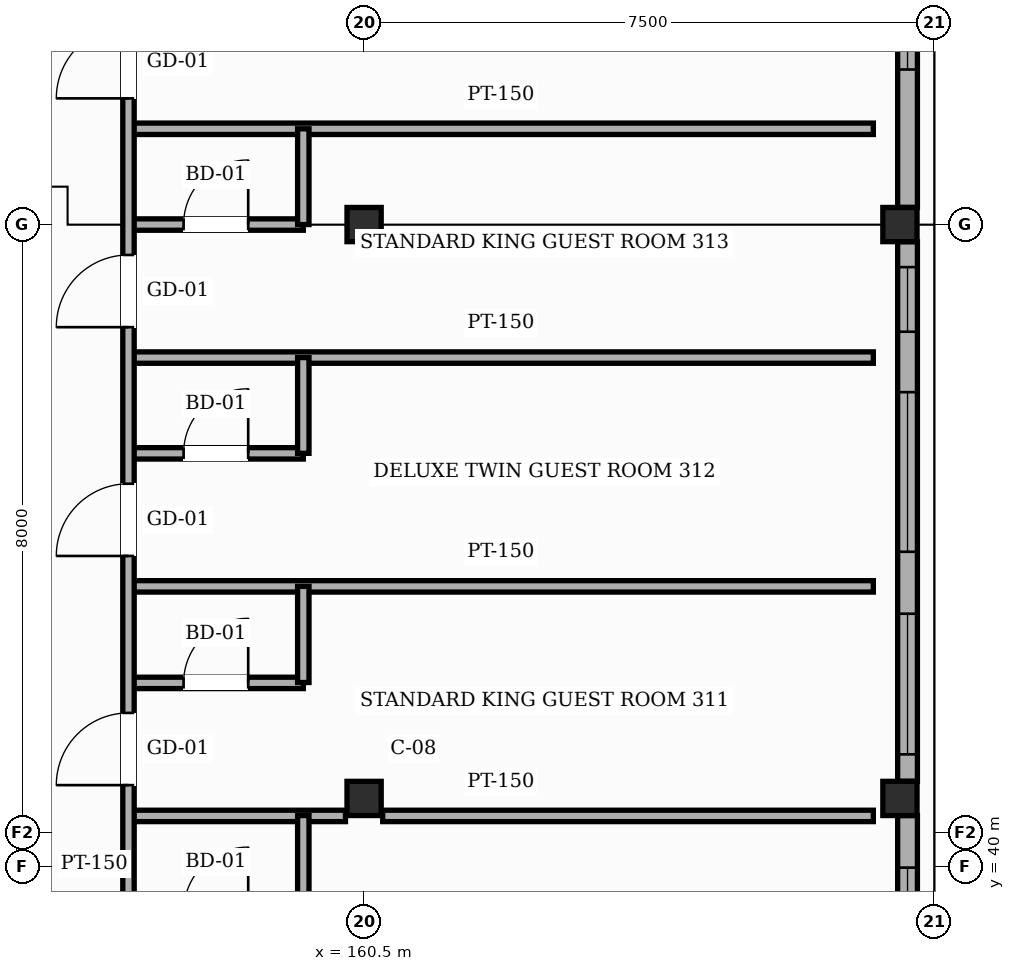
"""IFC4 building model, lengths in metres.
Left out: names, types, materials, properties, quantities, classifications, styles, units other than length and angle.
Written with IfcOpenShell. Run it as: python <this file> out.ifc"""

import sys

from ifc_helpers import new_model, si_unit, direction, frame, frame_2d, origin, origin_2d, place, context, subcontext, project, spatial, rectangle, hollow_rectangle, extrude, element, fill, save


model = new_model("IFC4")
c1 = context("Model", 3, precision=1e-05, world=origin(), true_north=direction((0.0, 1.0)))
c2 = subcontext(c1, "Body", "Model", "MODEL_VIEW")
j1 = project(units=[si_unit("LENGTHUNIT", "METRE"), si_unit("PLANEANGLEUNIT", "RADIAN")], contexts=[c1])
p1 = place(None, origin())
s1 = spatial("IfcSite", under=j1, at=p1, CompositionType="ELEMENT")
p2 = place(p1, origin())
s2 = spatial("IfcBuilding", under=s1, at=p2, CompositionType="ELEMENT")
p3 = place(p2, frame((0.0, 0.0, 42.6)))
s3 = spatial("IfcBuildingStorey", under=s2, at=p3, CompositionType="ELEMENT", Elevation=42.6)
for number, where, z_axis, x_axis in (
    (1, (160.5, 40.9, 0.0), (0.0, 0.0, 1.0), (1.0, 0.0, 0.0)),
    (2, (160.5, 48.45, 0.0), (0.0, 0.0, 1.0), (1.0, 0.0, 0.0)),
    (3, (167.55, 40.9, 0.0), (0.0, 0.0, 1.0), (1.0, 0.0, 0.0)),
    (4, (167.55, 48.45, 0.0), (0.0, 0.0, 1.0), (1.0, 0.0, 0.0)),
):
    element("IfcColumn", number, at=place(p3, frame(where, z_axis=z_axis, x_axis=x_axis)), inside=s3, PredefinedType="COLUMN", context=c2, shape_type="SweptSolid", body=[
        extrude(hollow_rectangle(XDim=0.45, YDim=0.45, WallThickness=0.019, InnerFilletRadius=0.019, OuterFilletRadius=0.038, at=origin_2d()), origin(), (0.0, 0.0, 1.0), 3.6),
    ])
p4 = place(p3, frame((167.65, 40.675, 0.0), z_axis=(0.0, 0.0, 1.0), x_axis=(0.0, -1.0, 0.0)))
e5 = element("IfcWall", 5, at=p4, inside=s3, PredefinedType="SOLIDWALL", context=c2, shape_type="SweptSolid", body=[
    extrude(rectangle(XDim=8.45, YDim=0.26, at=frame_2d((4.225, 0.0))), origin(), (0.0, 0.0, 1.0), 2.755),
])
p5 = place(p4, frame((6.61, 0.0, 0.85)))
e6 = element("IfcOpeningElement", 6, at=p5, cuts=e5, PredefinedType="OPENING", context=c2, shape_type="SweptSolid", body=[
    extrude(rectangle(XDim=1.25, YDim=1.65, at=frame_2d((0.625, 0.825))), frame((0.0, 0.14, 0.0), z_axis=(0.0, -1.0, 0.0), x_axis=(1.0, 0.0, 0.0)), (0.0, 0.0, 1.0), 0.28),
])
p6 = place(p4, frame((3.795, 0.0, 0.85)))
e7 = element("IfcOpeningElement", 7, at=p6, cuts=e5, PredefinedType="OPENING", context=c2, shape_type="SweptSolid", body=[
    extrude(rectangle(XDim=1.45, YDim=1.65, at=frame_2d((0.725, 0.825))), frame((0.0, 0.14, 0.0), z_axis=(0.0, -1.0, 0.0), x_axis=(1.0, 0.0, 0.0)), (0.0, 0.0, 1.0), 0.28),
])
p7 = place(p4, frame((0.685, 0.0, 0.85)))
e8 = element("IfcOpeningElement", 8, at=p7, cuts=e5, PredefinedType="OPENING", context=c2, shape_type="SweptSolid", body=[
    extrude(rectangle(XDim=1.65, YDim=1.65, at=frame_2d((0.825, 0.825))), frame((0.0, 0.14, 0.0), z_axis=(0.0, -1.0, 0.0), x_axis=(1.0, 0.0, 0.0)), (0.0, 0.0, 1.0), 0.28),
])
p8 = place(p3, frame((167.65, 48.225, 0.0), z_axis=(0.0, 0.0, 1.0), x_axis=(0.0, -1.0, 0.0)))
e9 = element("IfcWall", 9, at=p8, inside=s3, PredefinedType="SOLIDWALL", context=c2, shape_type="SweptSolid", body=[
    extrude(rectangle(XDim=7.1, YDim=0.26, at=frame_2d((3.55, 0.0))), origin(), (0.0, 0.0, 1.0), 2.755),
])
p9 = place(p8, frame((4.895, 0.0, 0.85)))
e10 = element("IfcOpeningElement", 10, at=p9, cuts=e9, PredefinedType="OPENING", context=c2, shape_type="SweptSolid", body=[
    extrude(rectangle(XDim=1.85, YDim=1.65, at=frame_2d((0.925, 0.825))), frame((0.0, 0.14, 0.0), z_axis=(0.0, -1.0, 0.0), x_axis=(1.0, 0.0, 0.0)), (0.0, 0.0, 1.0), 0.28),
])
p10 = place(p8, frame((1.98, 0.0, 0.85)))
e11 = element("IfcOpeningElement", 11, at=p10, cuts=e9, PredefinedType="OPENING", context=c2, shape_type="SweptSolid", body=[
    extrude(rectangle(XDim=2.1, YDim=1.65, at=frame_2d((1.05, 0.825))), frame((0.0, 0.14, 0.0), z_axis=(0.0, -1.0, 0.0), x_axis=(1.0, 0.0, 0.0)), (0.0, 0.0, 1.0), 0.28),
])
p11 = place(p8, frame((0.335, 0.0, 0.85)))
e12 = element("IfcOpeningElement", 12, at=p11, cuts=e9, PredefinedType="OPENING", context=c2, shape_type="SweptSolid", body=[
    extrude(rectangle(XDim=0.85, YDim=1.35, at=frame_2d((0.425, 0.675))), frame((0.0, 0.14, 0.0), z_axis=(0.0, -1.0, 0.0), x_axis=(1.0, 0.0, 0.0)), (0.0, 0.0, 1.0), 0.28),
])
p12 = place(p3, frame((167.65, 56.225, 0.0), z_axis=(0.0, 0.0, 1.0), x_axis=(0.0, -1.0, 0.0)))
e13 = element("IfcWall", 13, at=p12, inside=s3, PredefinedType="SOLIDWALL", context=c2, shape_type="SweptSolid", body=[
    extrude(rectangle(XDim=7.55, YDim=0.26, at=frame_2d((3.775, 0.0))), origin(), (0.0, 0.0, 1.0), 2.755),
])
p13 = place(p12, frame((4.285, 0.0, 0.85)))
e14 = element("IfcOpeningElement", 14, at=p13, cuts=e13, PredefinedType="OPENING", context=c2, shape_type="SweptSolid", body=[
    extrude(rectangle(XDim=1.45, YDim=1.35, at=frame_2d((0.725, 0.675))), frame((0.0, 0.14, 0.0), z_axis=(0.0, -1.0, 0.0), x_axis=(1.0, 0.0, 0.0)), (0.0, 0.0, 1.0), 0.28),
])
p14 = place(p12, frame((1.165, 0.0, 0.85)))
e15 = element("IfcOpeningElement", 15, at=p14, cuts=e13, PredefinedType="OPENING", context=c2, shape_type="SweptSolid", body=[
    extrude(rectangle(XDim=1.65, YDim=1.35, at=frame_2d((0.825, 0.675))), frame((0.0, 0.14, 0.0), z_axis=(0.0, -1.0, 0.0), x_axis=(1.0, 0.0, 0.0)), (0.0, 0.0, 1.0), 0.28),
])
p15 = place(p3, frame((157.4, 40.67, 0.0), z_axis=(0.0, 0.0, 1.0), x_axis=(1.0, 0.0, 0.0)))
e16 = element("IfcWall", 16, at=p15, inside=s3, PredefinedType="PARTITIONING", context=c2, shape_type="SweptSolid", body=[
    extrude(rectangle(XDim=2.855, YDim=0.15, at=frame_2d((1.427, 0.0))), origin(), (0.0, 0.0, 1.0), 2.755),
])
p16 = place(p3, frame((160.745, 40.67, 0.0), z_axis=(0.0, 0.0, 1.0), x_axis=(1.0, 0.0, 0.0)))
e17 = element("IfcWall", 17, at=p16, inside=s3, PredefinedType="PARTITIONING", context=c2, shape_type="SweptSolid", body=[
    extrude(rectangle(XDim=6.455, YDim=0.15, at=frame_2d((3.228, 0.0))), origin(), (0.0, 0.0, 1.0), 2.905),
])
p17 = place(p3, frame((157.4, 42.42, 0.0), z_axis=(0.0, 0.0, 1.0), x_axis=(1.0, 0.0, 0.0)))
e18 = element("IfcWall", 18, at=p17, inside=s3, PredefinedType="PARTITIONING", context=c2, shape_type="SweptSolid", body=[
    extrude(rectangle(XDim=2.3, YDim=0.15, at=frame_2d((1.15, 0.0))), origin(), (0.0, 0.0, 1.0), 3.365),
])
p18 = place(p17, frame((0.725, 0.0, 0.0)))
e19 = element("IfcOpeningElement", 19, at=p18, cuts=e18, PredefinedType="OPENING", context=c2, shape_type="SweptSolid", body=[
    extrude(rectangle(XDim=0.85, YDim=2.1, at=frame_2d((0.425, 1.05))), frame((0.0, 0.085, 0.0), z_axis=(0.0, -1.0, 0.0), x_axis=(1.0, 0.0, 0.0)), (0.0, 0.0, 1.0), 0.17),
])
p19 = place(p3, frame((157.4, 43.69, 0.0), z_axis=(0.0, 0.0, 1.0), x_axis=(1.0, 0.0, 0.0)))
e20 = element("IfcWall", 20, at=p19, inside=s3, PredefinedType="PARTITIONING", context=c2, shape_type="SweptSolid", body=[
    extrude(rectangle(XDim=9.8, YDim=0.15, at=frame_2d((4.9, 0.0))), origin(), (0.0, 0.0, 1.0), 3.365),
])
p20 = place(p3, frame((157.4, 45.44, 0.0), z_axis=(0.0, 0.0, 1.0), x_axis=(1.0, 0.0, 0.0)))
e21 = element("IfcWall", 21, at=p20, inside=s3, PredefinedType="PARTITIONING", context=c2, shape_type="SweptSolid", body=[
    extrude(rectangle(XDim=2.3, YDim=0.15, at=frame_2d((1.15, 0.0))), origin(), (0.0, 0.0, 1.0), 3.365),
])
p21 = place(p20, frame((0.725, 0.0, 0.0)))
e22 = element("IfcOpeningElement", 22, at=p21, cuts=e21, PredefinedType="OPENING", context=c2, shape_type="SweptSolid", body=[
    extrude(rectangle(XDim=0.85, YDim=2.1, at=frame_2d((0.425, 1.05))), frame((0.0, 0.085, 0.0), z_axis=(0.0, -1.0, 0.0), x_axis=(1.0, 0.0, 0.0)), (0.0, 0.0, 1.0), 0.17),
])
p22 = place(p3, frame((157.4, 46.7, 0.0), z_axis=(0.0, 0.0, 1.0), x_axis=(1.0, 0.0, 0.0)))
e23 = element("IfcWall", 23, at=p22, inside=s3, PredefinedType="PARTITIONING", context=c2, shape_type="SweptSolid", body=[
    extrude(rectangle(XDim=9.8, YDim=0.15, at=frame_2d((4.9, 0.0))), origin(), (0.0, 0.0, 1.0), 3.365),
])
p23 = place(p3, frame((157.4, 48.45, 0.0), z_axis=(0.0, 0.0, 1.0), x_axis=(1.0, 0.0, 0.0)))
e24 = element("IfcWall", 24, at=p23, inside=s3, PredefinedType="PARTITIONING", context=c2, shape_type="SweptSolid", body=[
    extrude(rectangle(XDim=2.3, YDim=0.15, at=frame_2d((1.15, 0.0))), origin(), (0.0, 0.0, 1.0), 3.365),
])
p24 = place(p23, frame((0.725, 0.0, 0.0)))
e25 = element("IfcOpeningElement", 25, at=p24, cuts=e24, PredefinedType="OPENING", context=c2, shape_type="SweptSolid", body=[
    extrude(rectangle(XDim=0.85, YDim=2.1, at=frame_2d((0.425, 1.05))), frame((0.0, 0.085, 0.0), z_axis=(0.0, -1.0, 0.0), x_axis=(1.0, 0.0, 0.0)), (0.0, 0.0, 1.0), 0.17),
])
p25 = place(p3, frame((157.4, 49.71, 0.0), z_axis=(0.0, 0.0, 1.0), x_axis=(1.0, 0.0, 0.0)))
e26 = element("IfcWall", 26, at=p25, inside=s3, PredefinedType="PARTITIONING", context=c2, shape_type="SweptSolid", body=[
    extrude(rectangle(XDim=9.8, YDim=0.15, at=frame_2d((4.9, 0.0))), origin(), (0.0, 0.0, 1.0), 3.365),
])
p26 = place(p3, frame((157.4, 22.6, 0.0), z_axis=(0.0, 0.0, 1.0), x_axis=(0.0, 1.0, 0.0)))
e27 = element("IfcWall", 27, at=p26, inside=s3, PredefinedType="PARTITIONING", context=c2, shape_type="SweptSolid", body=[
    extrude(rectangle(XDim=48.2, YDim=0.15, at=frame_2d((24.1, 0.0))), origin(), (0.0, 0.0, 1.0), 3.365),
])
p27 = place(p26, frame((0.325, 0.0, 0.0)))
e28 = element("IfcOpeningElement", 28, at=p27, cuts=e27, PredefinedType="OPENING", context=c2, shape_type="SweptSolid", body=[
    extrude(rectangle(XDim=1.1, YDim=2.2, at=frame_2d((0.55, 1.1))), frame((0.0, 0.085, 0.0), z_axis=(0.0, -1.0, 0.0), x_axis=(1.0, 0.0, 0.0)), (0.0, 0.0, 1.0), 0.17),
])
p28 = place(p26, frame((3.41, 0.0, 0.0)))
e29 = element("IfcOpeningElement", 29, at=p28, cuts=e27, PredefinedType="OPENING", context=c2, shape_type="SweptSolid", body=[
    extrude(rectangle(XDim=0.95, YDim=2.15, at=frame_2d((0.475, 1.075))), frame((0.0, 0.085, 0.0), z_axis=(0.0, -1.0, 0.0), x_axis=(1.0, 0.0, 0.0)), (0.0, 0.0, 1.0), 0.17),
])
p29 = place(p26, frame((6.425, 0.0, 0.0)))
e30 = element("IfcOpeningElement", 30, at=p29, cuts=e27, PredefinedType="OPENING", context=c2, shape_type="SweptSolid", body=[
    extrude(rectangle(XDim=0.95, YDim=2.15, at=frame_2d((0.475, 1.075))), frame((0.0, 0.085, 0.0), z_axis=(0.0, -1.0, 0.0), x_axis=(1.0, 0.0, 0.0)), (0.0, 0.0, 1.0), 0.17),
])
p30 = place(p26, frame((9.44, 0.0, 0.0)))
e31 = element("IfcOpeningElement", 31, at=p30, cuts=e27, PredefinedType="OPENING", context=c2, shape_type="SweptSolid", body=[
    extrude(rectangle(XDim=0.95, YDim=2.15, at=frame_2d((0.475, 1.075))), frame((0.0, 0.085, 0.0), z_axis=(0.0, -1.0, 0.0), x_axis=(1.0, 0.0, 0.0)), (0.0, 0.0, 1.0), 0.17),
])
p31 = place(p26, frame((12.45, 0.0, 0.0)))
e32 = element("IfcOpeningElement", 32, at=p31, cuts=e27, PredefinedType="OPENING", context=c2, shape_type="SweptSolid", body=[
    extrude(rectangle(XDim=0.95, YDim=2.15, at=frame_2d((0.475, 1.075))), frame((0.0, 0.085, 0.0), z_axis=(0.0, -1.0, 0.0), x_axis=(1.0, 0.0, 0.0)), (0.0, 0.0, 1.0), 0.17),
])
p32 = place(p26, frame((15.46, 0.0, 0.0)))
e33 = element("IfcOpeningElement", 33, at=p32, cuts=e27, PredefinedType="OPENING", context=c2, shape_type="SweptSolid", body=[
    extrude(rectangle(XDim=0.95, YDim=2.15, at=frame_2d((0.475, 1.075))), frame((0.0, 0.085, 0.0), z_axis=(0.0, -1.0, 0.0), x_axis=(1.0, 0.0, 0.0)), (0.0, 0.0, 1.0), 0.17),
])
p33 = place(p26, frame((18.475, 0.0, 0.0)))
e34 = element("IfcOpeningElement", 34, at=p33, cuts=e27, PredefinedType="OPENING", context=c2, shape_type="SweptSolid", body=[
    extrude(rectangle(XDim=0.95, YDim=2.15, at=frame_2d((0.475, 1.075))), frame((0.0, 0.085, 0.0), z_axis=(0.0, -1.0, 0.0), x_axis=(1.0, 0.0, 0.0)), (0.0, 0.0, 1.0), 0.17),
])
p34 = place(p26, frame((21.49, 0.0, 0.0)))
e35 = element("IfcOpeningElement", 35, at=p34, cuts=e27, PredefinedType="OPENING", context=c2, shape_type="SweptSolid", body=[
    extrude(rectangle(XDim=0.95, YDim=2.15, at=frame_2d((0.475, 1.075))), frame((0.0, 0.085, 0.0), z_axis=(0.0, -1.0, 0.0), x_axis=(1.0, 0.0, 0.0)), (0.0, 0.0, 1.0), 0.17),
])
p35 = place(p26, frame((24.5, 0.0, 0.0)))
e36 = element("IfcOpeningElement", 36, at=p35, cuts=e27, PredefinedType="OPENING", context=c2, shape_type="SweptSolid", body=[
    extrude(rectangle(XDim=0.95, YDim=2.15, at=frame_2d((0.475, 1.075))), frame((0.0, 0.085, 0.0), z_axis=(0.0, -1.0, 0.0), x_axis=(1.0, 0.0, 0.0)), (0.0, 0.0, 1.0), 0.17),
])
p36 = place(p26, frame((27.51, 0.0, 0.0)))
e37 = element("IfcOpeningElement", 37, at=p36, cuts=e27, PredefinedType="OPENING", context=c2, shape_type="SweptSolid", body=[
    extrude(rectangle(XDim=0.95, YDim=2.15, at=frame_2d((0.475, 1.075))), frame((0.0, 0.085, 0.0), z_axis=(0.0, -1.0, 0.0), x_axis=(1.0, 0.0, 0.0)), (0.0, 0.0, 1.0), 0.17),
])
p37 = place(p26, frame((30.525, 0.0, 0.0)))
e38 = element("IfcOpeningElement", 38, at=p37, cuts=e27, PredefinedType="OPENING", context=c2, shape_type="SweptSolid", body=[
    extrude(rectangle(XDim=0.95, YDim=2.15, at=frame_2d((0.475, 1.075))), frame((0.0, 0.085, 0.0), z_axis=(0.0, -1.0, 0.0), x_axis=(1.0, 0.0, 0.0)), (0.0, 0.0, 1.0), 0.17),
])
p38 = place(p26, frame((33.54, 0.0, 0.0)))
e39 = element("IfcOpeningElement", 39, at=p38, cuts=e27, PredefinedType="OPENING", context=c2, shape_type="SweptSolid", body=[
    extrude(rectangle(XDim=0.95, YDim=2.15, at=frame_2d((0.475, 1.075))), frame((0.0, 0.085, 0.0), z_axis=(0.0, -1.0, 0.0), x_axis=(1.0, 0.0, 0.0)), (0.0, 0.0, 1.0), 0.17),
])
p39 = place(p26, frame((36.55, 0.0, 0.0)))
e40 = element("IfcOpeningElement", 40, at=p39, cuts=e27, PredefinedType="OPENING", context=c2, shape_type="SweptSolid", body=[
    extrude(rectangle(XDim=0.95, YDim=2.15, at=frame_2d((0.475, 1.075))), frame((0.0, 0.085, 0.0), z_axis=(0.0, -1.0, 0.0), x_axis=(1.0, 0.0, 0.0)), (0.0, 0.0, 1.0), 0.17),
])
p40 = place(p26, frame((39.56, 0.0, 0.0)))
e41 = element("IfcOpeningElement", 41, at=p40, cuts=e27, PredefinedType="OPENING", context=c2, shape_type="SweptSolid", body=[
    extrude(rectangle(XDim=0.95, YDim=2.15, at=frame_2d((0.475, 1.075))), frame((0.0, 0.085, 0.0), z_axis=(0.0, -1.0, 0.0), x_axis=(1.0, 0.0, 0.0)), (0.0, 0.0, 1.0), 0.17),
])
p41 = place(p26, frame((42.575, 0.0, 0.0)))
e42 = element("IfcOpeningElement", 42, at=p41, cuts=e27, PredefinedType="OPENING", context=c2, shape_type="SweptSolid", body=[
    extrude(rectangle(XDim=0.95, YDim=2.15, at=frame_2d((0.475, 1.075))), frame((0.0, 0.085, 0.0), z_axis=(0.0, -1.0, 0.0), x_axis=(1.0, 0.0, 0.0)), (0.0, 0.0, 1.0), 0.17),
])
p42 = place(p26, frame((45.585, 0.0, 0.0)))
e43 = element("IfcOpeningElement", 43, at=p42, cuts=e27, PredefinedType="OPENING", context=c2, shape_type="SweptSolid", body=[
    extrude(rectangle(XDim=0.95, YDim=2.15, at=frame_2d((0.475, 1.075))), frame((0.0, 0.085, 0.0), z_axis=(0.0, -1.0, 0.0), x_axis=(1.0, 0.0, 0.0)), (0.0, 0.0, 1.0), 0.17),
])
p43 = place(p3, frame((159.7, 39.41, 0.0), z_axis=(0.0, 0.0, 1.0), x_axis=(0.0, 1.0, 0.0)))
e44 = element("IfcWall", 44, at=p43, inside=s3, PredefinedType="PARTITIONING", context=c2, shape_type="SweptSolid", body=[
    extrude(rectangle(XDim=1.265, YDim=0.15, at=frame_2d((0.633, 0.0))), origin(), (0.0, 0.0, 1.0), 3.365),
])
p44 = place(p3, frame((159.7, 42.425, 0.0), z_axis=(0.0, 0.0, 1.0), x_axis=(0.0, 1.0, 0.0)))
e45 = element("IfcWall", 45, at=p44, inside=s3, PredefinedType="PARTITIONING", context=c2, shape_type="SweptSolid", body=[
    extrude(rectangle(XDim=1.265, YDim=0.15, at=frame_2d((0.632, 0.0))), origin(), (0.0, 0.0, 1.0), 3.365),
])
for number, where, z_axis, x_axis in (
    (46, (159.7, 45.44, 0.0), (0.0, 0.0, 1.0), (0.0, 1.0, 0.0)),
    (47, (159.7, 48.45, 0.0), (0.0, 0.0, 1.0), (0.0, 1.0, 0.0)),
):
    element("IfcWall", number, at=place(p3, frame(where, z_axis=z_axis, x_axis=x_axis)), inside=s3, PredefinedType="PARTITIONING", context=c2, shape_type="SweptSolid", body=[
        extrude(rectangle(XDim=1.26, YDim=0.15, at=frame_2d((0.63, 0.0))), origin(), (0.0, 0.0, 1.0), 3.365),
    ])
p45 = place(p7, origin())
e48 = element("IfcWindow", 48, at=p45, inside=s3, PartitioningType="SINGLE_PANEL", PredefinedType="WINDOW", context=c2, shape_type="SweptSolid", body=[
    extrude(rectangle(XDim=1.65, YDim=1.65, at=frame_2d((0.825, 0.825))), frame((0.0, 0.03, 0.0), z_axis=(0.0, -1.0, 0.0), x_axis=(1.0, 0.0, 0.0)), (0.0, 0.0, 1.0), 0.06),
])
fill(e8, e48)
p46 = place(p9, origin())
e49 = element("IfcWindow", 49, at=p46, inside=s3, PartitioningType="SINGLE_PANEL", PredefinedType="WINDOW", context=c2, shape_type="SweptSolid", body=[
    extrude(rectangle(XDim=1.85, YDim=1.65, at=frame_2d((0.925, 0.825))), frame((0.0, 0.03, 0.0), z_axis=(0.0, -1.0, 0.0), x_axis=(1.0, 0.0, 0.0)), (0.0, 0.0, 1.0), 0.06),
])
fill(e10, e49)
p47 = place(p10, origin())
e50 = element("IfcWindow", 50, at=p47, inside=s3, PartitioningType="SINGLE_PANEL", PredefinedType="WINDOW", context=c2, shape_type="SweptSolid", body=[
    extrude(rectangle(XDim=2.1, YDim=1.65, at=frame_2d((1.05, 0.825))), frame((0.0, 0.03, 0.0), z_axis=(0.0, -1.0, 0.0), x_axis=(1.0, 0.0, 0.0)), (0.0, 0.0, 1.0), 0.06),
])
fill(e11, e50)
p48 = place(p11, origin())
e51 = element("IfcWindow", 51, at=p48, inside=s3, PartitioningType="SINGLE_PANEL", PredefinedType="WINDOW", context=c2, shape_type="SweptSolid", body=[
    extrude(rectangle(XDim=0.85, YDim=1.35, at=frame_2d((0.425, 0.675))), frame((0.0, 0.03, 0.0), z_axis=(0.0, -1.0, 0.0), x_axis=(1.0, 0.0, 0.0)), (0.0, 0.0, 1.0), 0.06),
])
fill(e12, e51)
p49 = place(p13, origin())
e52 = element("IfcWindow", 52, at=p49, inside=s3, PartitioningType="SINGLE_PANEL", PredefinedType="WINDOW", context=c2, shape_type="SweptSolid", body=[
    extrude(rectangle(XDim=1.45, YDim=1.35, at=frame_2d((0.725, 0.675))), frame((0.0, 0.03, 0.0), z_axis=(0.0, -1.0, 0.0), x_axis=(1.0, 0.0, 0.0)), (0.0, 0.0, 1.0), 0.06),
])
fill(e14, e52)
p50 = place(p33, origin())
e53 = element("IfcDoor", 53, at=p50, inside=s3, OperationType="SINGLE_SWING_LEFT", PredefinedType="DOOR", context=c2, shape_type="SweptSolid", body=[
    extrude(rectangle(XDim=0.95, YDim=2.15, at=frame_2d((0.475, 1.075))), frame((0.0, 0.025, 0.0), z_axis=(0.0, -1.0, 0.0), x_axis=(1.0, 0.0, 0.0)), (0.0, 0.0, 1.0), 0.05),
])
fill(e34, e53)
p51 = place(p18, origin())
e54 = element("IfcDoor", 54, at=p51, inside=s3, OperationType="SINGLE_SWING_RIGHT", PredefinedType="DOOR", context=c2, shape_type="SweptSolid", body=[
    extrude(rectangle(XDim=0.85, YDim=2.1, at=frame_2d((0.425, 1.05))), frame((0.0, 0.025, 0.0), z_axis=(0.0, -1.0, 0.0), x_axis=(1.0, 0.0, 0.0)), (0.0, 0.0, 1.0), 0.05),
])
fill(e19, e54)
p52 = place(p34, origin())
e55 = element("IfcDoor", 55, at=p52, inside=s3, OperationType="SINGLE_SWING_LEFT", PredefinedType="DOOR", context=c2, shape_type="SweptSolid", body=[
    extrude(rectangle(XDim=0.95, YDim=2.15, at=frame_2d((0.475, 1.075))), frame((0.0, 0.025, 0.0), z_axis=(0.0, -1.0, 0.0), x_axis=(1.0, 0.0, 0.0)), (0.0, 0.0, 1.0), 0.05),
])
fill(e35, e55)
p53 = place(p21, origin())
e56 = element("IfcDoor", 56, at=p53, inside=s3, OperationType="SINGLE_SWING_RIGHT", PredefinedType="DOOR", context=c2, shape_type="SweptSolid", body=[
    extrude(rectangle(XDim=0.85, YDim=2.1, at=frame_2d((0.425, 1.05))), frame((0.0, 0.025, 0.0), z_axis=(0.0, -1.0, 0.0), x_axis=(1.0, 0.0, 0.0)), (0.0, 0.0, 1.0), 0.05),
])
fill(e22, e56)
p54 = place(p35, origin())
e57 = element("IfcDoor", 57, at=p54, inside=s3, OperationType="SINGLE_SWING_LEFT", PredefinedType="DOOR", context=c2, shape_type="SweptSolid", body=[
    extrude(rectangle(XDim=0.95, YDim=2.15, at=frame_2d((0.475, 1.075))), frame((0.0, 0.025, 0.0), z_axis=(0.0, -1.0, 0.0), x_axis=(1.0, 0.0, 0.0)), (0.0, 0.0, 1.0), 0.05),
])
fill(e36, e57)
p55 = place(p24, origin())
e58 = element("IfcDoor", 58, at=p55, inside=s3, OperationType="SINGLE_SWING_RIGHT", PredefinedType="DOOR", context=c2, shape_type="SweptSolid", body=[
    extrude(rectangle(XDim=0.85, YDim=2.1, at=frame_2d((0.425, 1.05))), frame((0.0, 0.025, 0.0), z_axis=(0.0, -1.0, 0.0), x_axis=(1.0, 0.0, 0.0)), (0.0, 0.0, 1.0), 0.05),
])
fill(e25, e58)
p56 = place(p36, origin())
e59 = element("IfcDoor", 59, at=p56, inside=s3, OperationType="SINGLE_SWING_LEFT", PredefinedType="DOOR", context=c2, shape_type="SweptSolid", body=[
    extrude(rectangle(XDim=0.95, YDim=2.15, at=frame_2d((0.475, 1.075))), frame((0.0, 0.025, 0.0), z_axis=(0.0, -1.0, 0.0), x_axis=(1.0, 0.0, 0.0)), (0.0, 0.0, 1.0), 0.05),
])
fill(e37, e59)
save(model, sys.argv[1])
